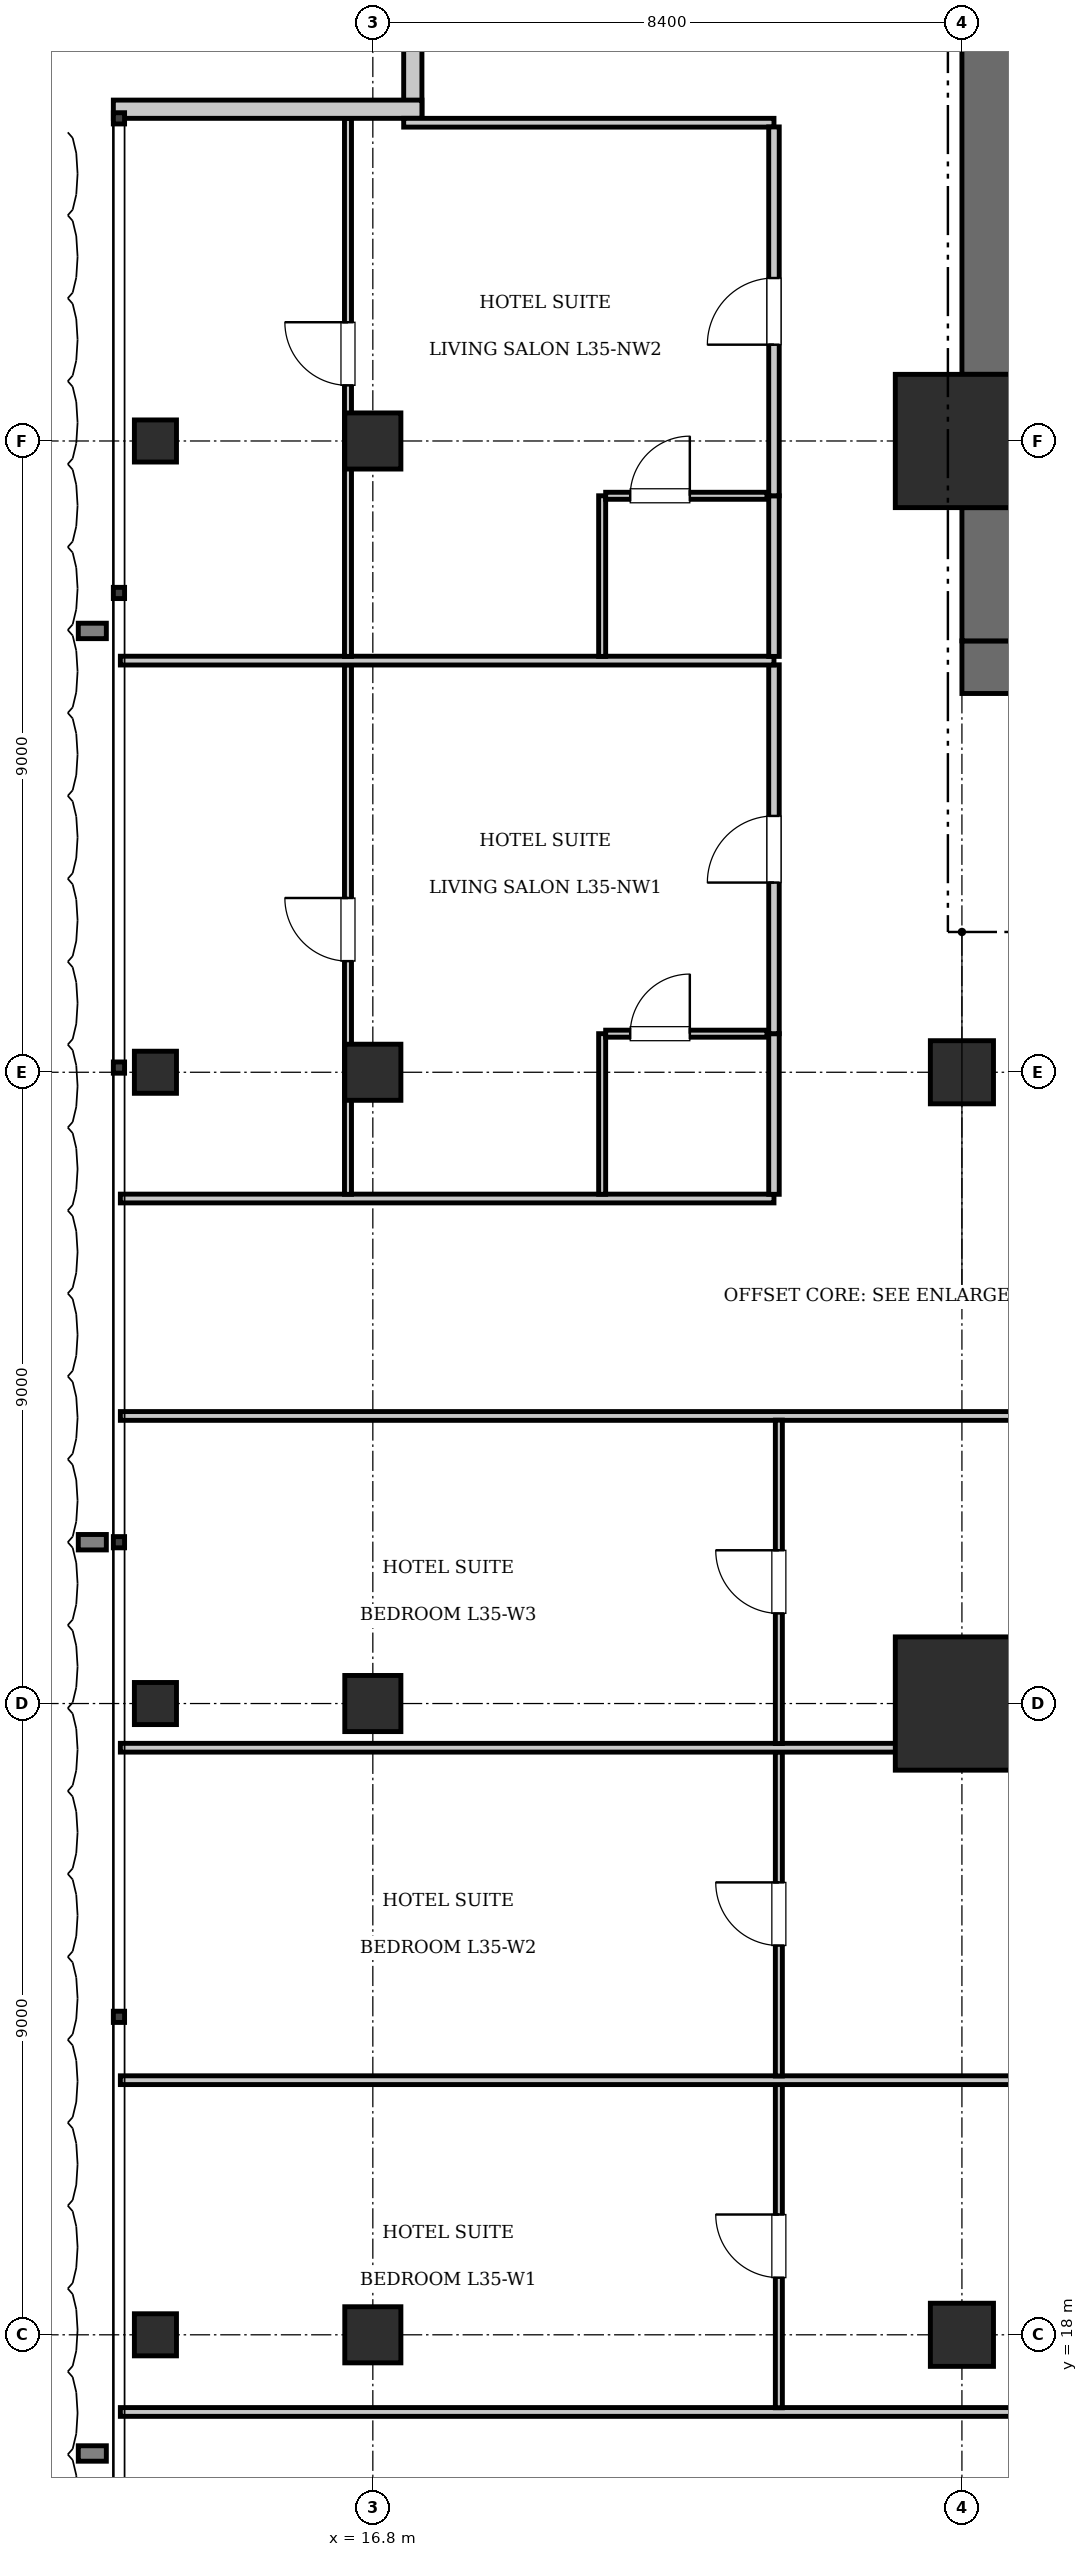
"""IFC4 building model, lengths in metres.
Left out: names, types, materials, properties, quantities, classifications, styles, units other than length and angle.
Written with IfcOpenShell. Run it as: python <this file> out.ifc"""

import sys

from ifc_helpers import new_model, si_unit, direction, frame, frame_2d, origin, origin_2d, place, context, subcontext, project, spatial, rectangle, i_section, extrude, element, fill, save


model = new_model("IFC4")
c1 = context("Model", 3, precision=1e-05, world=origin(), true_north=direction((0.0, 1.0)))
c2 = subcontext(c1, "Body", "Model", "MODEL_VIEW")
j1 = project(units=[si_unit("LENGTHUNIT", "METRE"), si_unit("PLANEANGLEUNIT", "RADIAN")], contexts=[c1])
p1 = place(None, origin())
s1 = spatial("IfcSite", under=j1, at=p1, CompositionType="ELEMENT")
p2 = place(p1, origin())
s2 = spatial("IfcBuilding", under=s1, at=p2, CompositionType="ELEMENT")
p3 = place(p2, frame((0.0, 0.0, 146.65)))
s3 = spatial("IfcBuildingStorey", under=s2, at=p3, CompositionType="ELEMENT", Elevation=146.65)
for number, where, z_axis, x_axis in (
    (1, (25.2, 27.0, 0.0), (0.0, 0.0, 1.0), (1.0, 0.0, 0.0)),
    (2, (25.2, 45.0, 0.0), (0.0, 0.0, 1.0), (1.0, 0.0, 0.0)),
):
    element("IfcColumn", number, at=place(p3, frame(where, z_axis=z_axis, x_axis=x_axis)), inside=s3, PredefinedType="COLUMN", context=c2, shape_type="SweptSolid", body=[
        extrude(rectangle(XDim=1.9, YDim=1.9, at=origin_2d()), origin(), (0.0, 0.0, 1.0), 3.85),
    ])
p4 = place(p3, frame((25.2, 41.775, 0.0), z_axis=(0.0, 0.0, 1.0), x_axis=(1.0, 0.0, 0.0)))
e3 = element("IfcWall", 3, at=p4, inside=s3, PredefinedType="SHEAR", context=c2, shape_type="SweptSolid", body=[
    extrude(rectangle(XDim=6.8, YDim=0.75, at=frame_2d((3.4, 0.0))), origin(), (0.0, 0.0, 1.0), 3.85),
])
p5 = place(p4, frame((1.65, 0.0, 0.0)))
e4 = element("IfcOpeningElement", 4, at=p5, cuts=e3, PredefinedType="OPENING", context=c2, shape_type="SweptSolid", body=[
    extrude(rectangle(XDim=1.15, YDim=2.15, at=frame_2d((0.575, 1.075))), frame((0.0, 0.385, 0.0), z_axis=(0.0, -1.0, 0.0), x_axis=(1.0, 0.0, 0.0)), (0.0, 0.0, 1.0), 0.77),
])
p6 = place(p4, frame((5.15, 0.0, 0.0)))
e5 = element("IfcOpeningElement", 5, at=p6, cuts=e3, PredefinedType="OPENING", context=c2, shape_type="SweptSolid", body=[
    extrude(rectangle(XDim=1.1, YDim=2.2, at=frame_2d((0.55, 1.1))), frame((0.0, 0.385, 0.0), z_axis=(0.0, -1.0, 0.0), x_axis=(1.0, 0.0, 0.0)), (0.0, 0.0, 1.0), 0.77),
])
p7 = place(p3, frame((25.575, 42.15, 0.0), z_axis=(0.0, 0.0, 1.0), x_axis=(0.0, 1.0, 0.0)))
e6 = element("IfcWall", 6, at=p7, inside=s3, PredefinedType="SHEAR", context=c2, shape_type="SweptSolid", body=[
    extrude(rectangle(XDim=1.9, YDim=0.75, at=frame_2d((0.95, 0.0))), origin(), (0.0, 0.0, 1.0), 3.85),
])
p8 = place(p3, frame((25.575, 45.95, 0.0), z_axis=(0.0, 0.0, 1.0), x_axis=(0.0, 1.0, 0.0)))
e7 = element("IfcWall", 7, at=p8, inside=s3, PredefinedType="SHEAR", context=c2, shape_type="SweptSolid", body=[
    extrude(rectangle(XDim=7.3, YDim=0.75, at=frame_2d((3.65, 0.0))), origin(), (0.0, 0.0, 1.0), 3.85),
])
for number, where, z_axis, x_axis in (
    (8, (25.2, 36.0, 0.0), (0.0, 0.0, 1.0), (1.0, 0.0, 0.0)),
    (9, (25.2, 18.0, 0.0), (0.0, 0.0, 1.0), (1.0, 0.0, 0.0)),
):
    element("IfcColumn", number, at=place(p3, frame(where, z_axis=z_axis, x_axis=x_axis)), inside=s3, PredefinedType="COLUMN", context=c2, shape_type="SweptSolid", body=[
        extrude(rectangle(XDim=0.9, YDim=0.9, at=origin_2d()), origin(), (0.0, 0.0, 1.0), 3.85),
    ])
for number, where, z_axis, x_axis in (
    (10, (16.8, 18.0, 0.0), (0.0, 0.0, 1.0), (1.0, 0.0, 0.0)),
    (11, (16.8, 27.0, 0.0), (0.0, 0.0, 1.0), (1.0, 0.0, 0.0)),
    (12, (16.8, 36.0, 0.0), (0.0, 0.0, 1.0), (1.0, 0.0, 0.0)),
    (13, (16.8, 45.0, 0.0), (0.0, 0.0, 1.0), (1.0, 0.0, 0.0)),
):
    element("IfcColumn", number, at=place(p3, frame(where, z_axis=z_axis, x_axis=x_axis)), inside=s3, PredefinedType="COLUMN", context=c2, shape_type="SweptSolid", body=[
        extrude(rectangle(XDim=0.8, YDim=0.8, at=origin_2d()), origin(), (0.0, 0.0, 1.0), 3.85),
    ])
for number, where, z_axis, x_axis in (
    (14, (13.7, 18.0, 0.0), (0.0, 0.0, 1.0), (1.0, 0.0, 0.0)),
    (15, (13.7, 27.0, 0.0), (0.0, 0.0, 1.0), (1.0, 0.0, 0.0)),
    (16, (13.7, 36.0, 0.0), (0.0, 0.0, 1.0), (1.0, 0.0, 0.0)),
    (17, (13.7, 45.0, 0.0), (0.0, 0.0, 1.0), (1.0, 0.0, 0.0)),
):
    element("IfcColumn", number, at=place(p3, frame(where, z_axis=z_axis, x_axis=x_axis)), inside=s3, PredefinedType="COLUMN", context=c2, shape_type="SweptSolid", body=[
        extrude(i_section(OverallWidth=0.6, OverallDepth=0.6, WebThickness=0.025, FlangeThickness=0.038, at=origin_2d()), origin(), (0.0, 0.0, 1.0), 3.85),
    ])
for number, where, z_axis, x_axis in (
    (18, (17.37, 49.6, 0.0), (0.0, 0.0, 1.0), (0.0, 1.0, 0.0)),
    (19, (13.1, 49.73, 0.0), (0.0, 0.0, 1.0), (1.0, 0.0, 0.0)),
):
    element("IfcWall", number, at=place(p3, frame(where, z_axis=z_axis, x_axis=x_axis)), inside=s3, PredefinedType="SOLIDWALL", context=c2, shape_type="SweptSolid", body=[
        extrude(rectangle(XDim=4.4, YDim=0.26, at=frame_2d((2.2, 0.0))), origin(), (0.0, 0.0, 1.0), 3.61),
    ])
for number, where, z_axis, x_axis in (
    (20, (13.2, 16.9, 0.0), (0.0, 0.0, 1.0), (1.0, 0.0, 0.0)),
    (21, (13.2, 31.1, 0.0), (0.0, 0.0, 1.0), (1.0, 0.0, 0.0)),
):
    element("IfcWall", number, at=place(p3, frame(where, z_axis=z_axis, x_axis=x_axis)), inside=s3, PredefinedType="PARTITIONING", context=c2, shape_type="SweptSolid", body=[
        extrude(rectangle(XDim=22.12, YDim=0.125, at=frame_2d((11.06, 0.0))), origin(), (0.0, 0.0, 1.0), 3.61),
    ])
p9 = place(p3, frame((22.59, 16.96, 0.0), z_axis=(0.0, 0.0, 1.0), x_axis=(0.0, 1.0, 0.0)))
e22 = element("IfcWall", 22, at=p9, inside=s3, PredefinedType="PARTITIONING", context=c2, shape_type="SweptSolid", body=[
    extrude(rectangle(XDim=4.61, YDim=0.1, at=frame_2d((2.305, 0.0))), origin(), (0.0, 0.0, 1.0), 3.61),
])
p10 = place(p9, frame((1.855, 0.0, 0.0)))
e23 = element("IfcOpeningElement", 23, at=p10, cuts=e22, PredefinedType="OPENING", context=c2, shape_type="SweptSolid", body=[
    extrude(rectangle(XDim=0.9, YDim=2.1, at=frame_2d((0.45, 1.05))), frame((0.0, 0.06, 0.0), z_axis=(0.0, -1.0, 0.0), x_axis=(1.0, 0.0, 0.0)), (0.0, 0.0, 1.0), 0.12),
])
p11 = place(p3, frame((13.2, 21.63, 0.0), z_axis=(0.0, 0.0, 1.0), x_axis=(1.0, 0.0, 0.0)))
e24 = element("IfcWall", 24, at=p11, inside=s3, PredefinedType="PARTITIONING", context=c2, shape_type="SweptSolid", body=[
    extrude(rectangle(XDim=22.12, YDim=0.125, at=frame_2d((11.06, 0.0))), origin(), (0.0, 0.0, 1.0), 3.61),
])
p12 = place(p3, frame((22.59, 21.69, 0.0), z_axis=(0.0, 0.0, 1.0), x_axis=(0.0, 1.0, 0.0)))
e25 = element("IfcWall", 25, at=p12, inside=s3, PredefinedType="PARTITIONING", context=c2, shape_type="SweptSolid", body=[
    extrude(rectangle(XDim=4.62, YDim=0.1, at=frame_2d((2.31, 0.0))), origin(), (0.0, 0.0, 1.0), 3.61),
])
p13 = place(p12, frame((1.86, 0.0, 0.0)))
e26 = element("IfcOpeningElement", 26, at=p13, cuts=e25, PredefinedType="OPENING", context=c2, shape_type="SweptSolid", body=[
    extrude(rectangle(XDim=0.9, YDim=2.1, at=frame_2d((0.45, 1.05))), frame((0.0, 0.06, 0.0), z_axis=(0.0, -1.0, 0.0), x_axis=(1.0, 0.0, 0.0)), (0.0, 0.0, 1.0), 0.12),
])
p14 = place(p3, frame((13.2, 26.37, 0.0), z_axis=(0.0, 0.0, 1.0), x_axis=(1.0, 0.0, 0.0)))
e27 = element("IfcWall", 27, at=p14, inside=s3, PredefinedType="PARTITIONING", context=c2, shape_type="SweptSolid", body=[
    extrude(rectangle(XDim=22.12, YDim=0.125, at=frame_2d((11.06, 0.0))), origin(), (0.0, 0.0, 1.0), 3.61),
])
p15 = place(p3, frame((22.59, 26.43, 0.0), z_axis=(0.0, 0.0, 1.0), x_axis=(0.0, 1.0, 0.0)))
e28 = element("IfcWall", 28, at=p15, inside=s3, PredefinedType="PARTITIONING", context=c2, shape_type="SweptSolid", body=[
    extrude(rectangle(XDim=4.61, YDim=0.1, at=frame_2d((2.305, 0.0))), origin(), (0.0, 0.0, 1.0), 3.61),
])
p16 = place(p15, frame((1.855, 0.0, 0.0)))
e29 = element("IfcOpeningElement", 29, at=p16, cuts=e28, PredefinedType="OPENING", context=c2, shape_type="SweptSolid", body=[
    extrude(rectangle(XDim=0.9, YDim=2.1, at=frame_2d((0.45, 1.05))), frame((0.0, 0.06, 0.0), z_axis=(0.0, -1.0, 0.0), x_axis=(1.0, 0.0, 0.0)), (0.0, 0.0, 1.0), 0.12),
])
p17 = place(p3, frame((13.2, 34.2, 0.0), z_axis=(0.0, 0.0, 1.0), x_axis=(1.0, 0.0, 0.0)))
e30 = element("IfcWall", 30, at=p17, inside=s3, PredefinedType="PARTITIONING", context=c2, shape_type="SweptSolid", body=[
    extrude(rectangle(XDim=9.32, YDim=0.125, at=frame_2d((4.66, 0.0))), origin(), (0.0, 0.0, 1.0), 3.61),
])
p18 = place(p3, frame((17.24, 49.538, 0.0), z_axis=(0.0, 0.0, 1.0), x_axis=(1.0, 0.0, 0.0)))
e31 = element("IfcWall", 31, at=p18, inside=s3, PredefinedType="PARTITIONING", context=c2, shape_type="SweptSolid", body=[
    extrude(rectangle(XDim=5.28, YDim=0.125, at=frame_2d((2.64, 0.0))), origin(), (0.0, 0.0, 1.0), 3.61),
])
p19 = place(p3, frame((22.52, 34.26, 0.0), z_axis=(0.0, 0.0, 1.0), x_axis=(0.0, 1.0, 0.0)))
e32 = element("IfcWall", 32, at=p19, inside=s3, PredefinedType="PARTITIONING", context=c2, shape_type="SweptSolid", body=[
    extrude(rectangle(XDim=2.29, YDim=0.15, at=frame_2d((1.145, 0.0))), origin(), (0.0, 0.0, 1.0), 3.61),
])
p20 = place(p3, frame((22.52, 36.55, 0.0), z_axis=(0.0, 0.0, 1.0), x_axis=(0.0, 1.0, 0.0)))
e33 = element("IfcWall", 33, at=p20, inside=s3, PredefinedType="PARTITIONING", context=c2, shape_type="SweptSolid", body=[
    extrude(rectangle(XDim=5.259, YDim=0.15, at=frame_2d((2.629, 0.0))), origin(), (0.0, 0.0, 1.0), 3.61),
])
p21 = place(p20, frame((2.154, 0.0, 0.0)))
e34 = element("IfcOpeningElement", 34, at=p21, cuts=e33, PredefinedType="OPENING", context=c2, shape_type="SweptSolid", body=[
    extrude(rectangle(XDim=0.95, YDim=2.15, at=frame_2d((0.475, 1.075))), frame((0.0, 0.085, 0.0), z_axis=(0.0, -1.0, 0.0), x_axis=(1.0, 0.0, 0.0)), (0.0, 0.0, 1.0), 0.17),
])
p22 = place(p3, frame((20.07, 34.26, 0.0), z_axis=(0.0, 0.0, 1.0), x_axis=(0.0, 1.0, 0.0)))
e35 = element("IfcWall", 35, at=p22, inside=s3, PredefinedType="PARTITIONING", context=c2, shape_type="SweptSolid", body=[
    extrude(rectangle(XDim=2.29, YDim=0.1, at=frame_2d((1.145, 0.0))), origin(), (0.0, 0.0, 1.0), 3.61),
])
p23 = place(p3, frame((20.12, 36.55, 0.0), z_axis=(0.0, 0.0, 1.0), x_axis=(1.0, 0.0, 0.0)))
e36 = element("IfcWall", 36, at=p23, inside=s3, PredefinedType="PARTITIONING", context=c2, shape_type="SweptSolid", body=[
    extrude(rectangle(XDim=2.3, YDim=0.1, at=frame_2d((1.15, 0.0))), origin(), (0.0, 0.0, 1.0), 3.61),
])
p24 = place(p23, frame((0.35, 0.0, 0.0)))
e37 = element("IfcOpeningElement", 37, at=p24, cuts=e36, PredefinedType="OPENING", context=c2, shape_type="SweptSolid", body=[
    extrude(rectangle(XDim=0.85, YDim=2.1, at=frame_2d((0.425, 1.05))), frame((0.0, 0.06, 0.0), z_axis=(0.0, -1.0, 0.0), x_axis=(1.0, 0.0, 0.0)), (0.0, 0.0, 1.0), 0.12),
])
p25 = place(p3, frame((16.446, 34.26, 0.0), z_axis=(0.0, 0.0, 1.0), x_axis=(0.0, 1.0, 0.0)))
e38 = element("IfcWall", 38, at=p25, inside=s3, PredefinedType="PARTITIONING", context=c2, shape_type="SweptSolid", body=[
    extrude(rectangle(XDim=7.549, YDim=0.1, at=frame_2d((3.774, 0.0))), origin(), (0.0, 0.0, 1.0), 3.61),
])
p26 = place(p25, frame((3.324, 0.0, 0.0)))
e39 = element("IfcOpeningElement", 39, at=p26, cuts=e38, PredefinedType="OPENING", context=c2, shape_type="SweptSolid", body=[
    extrude(rectangle(XDim=0.9, YDim=2.1, at=frame_2d((0.45, 1.05))), frame((0.0, 0.06, 0.0), z_axis=(0.0, -1.0, 0.0), x_axis=(1.0, 0.0, 0.0)), (0.0, 0.0, 1.0), 0.12),
])
p27 = place(p3, frame((13.2, 41.869, 0.0), z_axis=(0.0, 0.0, 1.0), x_axis=(1.0, 0.0, 0.0)))
e40 = element("IfcWall", 40, at=p27, inside=s3, PredefinedType="PARTITIONING", context=c2, shape_type="SweptSolid", body=[
    extrude(rectangle(XDim=9.32, YDim=0.125, at=frame_2d((4.66, 0.0))), origin(), (0.0, 0.0, 1.0), 3.61),
])
p28 = place(p3, frame((22.52, 41.929, 0.0), z_axis=(0.0, 0.0, 1.0), x_axis=(0.0, 1.0, 0.0)))
e41 = element("IfcWall", 41, at=p28, inside=s3, PredefinedType="PARTITIONING", context=c2, shape_type="SweptSolid", body=[
    extrude(rectangle(XDim=2.29, YDim=0.15, at=frame_2d((1.145, 0.0))), origin(), (0.0, 0.0, 1.0), 3.61),
])
p29 = place(p3, frame((22.52, 44.219, 0.0), z_axis=(0.0, 0.0, 1.0), x_axis=(0.0, 1.0, 0.0)))
e42 = element("IfcWall", 42, at=p29, inside=s3, PredefinedType="PARTITIONING", context=c2, shape_type="SweptSolid", body=[
    extrude(rectangle(XDim=5.259, YDim=0.15, at=frame_2d((2.629, 0.0))), origin(), (0.0, 0.0, 1.0), 3.61),
])
p30 = place(p29, frame((2.154, 0.0, 0.0)))
e43 = element("IfcOpeningElement", 43, at=p30, cuts=e42, PredefinedType="OPENING", context=c2, shape_type="SweptSolid", body=[
    extrude(rectangle(XDim=0.95, YDim=2.15, at=frame_2d((0.475, 1.075))), frame((0.0, 0.085, 0.0), z_axis=(0.0, -1.0, 0.0), x_axis=(1.0, 0.0, 0.0)), (0.0, 0.0, 1.0), 0.17),
])
p31 = place(p3, frame((20.07, 41.929, 0.0), z_axis=(0.0, 0.0, 1.0), x_axis=(0.0, 1.0, 0.0)))
e44 = element("IfcWall", 44, at=p31, inside=s3, PredefinedType="PARTITIONING", context=c2, shape_type="SweptSolid", body=[
    extrude(rectangle(XDim=2.29, YDim=0.1, at=frame_2d((1.145, 0.0))), origin(), (0.0, 0.0, 1.0), 3.61),
])
p32 = place(p3, frame((20.12, 44.219, 0.0), z_axis=(0.0, 0.0, 1.0), x_axis=(1.0, 0.0, 0.0)))
e45 = element("IfcWall", 45, at=p32, inside=s3, PredefinedType="PARTITIONING", context=c2, shape_type="SweptSolid", body=[
    extrude(rectangle(XDim=2.3, YDim=0.1, at=frame_2d((1.15, 0.0))), origin(), (0.0, 0.0, 1.0), 3.61),
])
p33 = place(p32, frame((0.35, 0.0, 0.0)))
e46 = element("IfcOpeningElement", 46, at=p33, cuts=e45, PredefinedType="OPENING", context=c2, shape_type="SweptSolid", body=[
    extrude(rectangle(XDim=0.85, YDim=2.1, at=frame_2d((0.425, 1.05))), frame((0.0, 0.06, 0.0), z_axis=(0.0, -1.0, 0.0), x_axis=(1.0, 0.0, 0.0)), (0.0, 0.0, 1.0), 0.12),
])
p34 = place(p3, frame((16.446, 41.929, 0.0), z_axis=(0.0, 0.0, 1.0), x_axis=(0.0, 1.0, 0.0)))
e47 = element("IfcWall", 47, at=p34, inside=s3, PredefinedType="PARTITIONING", context=c2, shape_type="SweptSolid", body=[
    extrude(rectangle(XDim=7.669, YDim=0.1, at=frame_2d((3.834, 0.0))), origin(), (0.0, 0.0, 1.0), 3.61),
])
p35 = place(p34, frame((3.864, 0.0, 0.0)))
e48 = element("IfcOpeningElement", 48, at=p35, cuts=e47, PredefinedType="OPENING", context=c2, shape_type="SweptSolid", body=[
    extrude(rectangle(XDim=0.9, YDim=2.1, at=frame_2d((0.45, 1.05))), frame((0.0, 0.06, 0.0), z_axis=(0.0, -1.0, 0.0), x_axis=(1.0, 0.0, 0.0)), (0.0, 0.0, 1.0), 0.12),
])
p36 = place(p10, origin())
e49 = element("IfcDoor", 49, at=p36, inside=s3, OperationType="SINGLE_SWING_RIGHT", PredefinedType="DOOR", context=c2, shape_type="SweptSolid", body=[
    extrude(rectangle(XDim=0.9, YDim=2.1, at=frame_2d((0.45, 1.05))), frame((0.0, 0.025, 0.0), z_axis=(0.0, -1.0, 0.0), x_axis=(1.0, 0.0, 0.0)), (0.0, 0.0, 1.0), 0.05),
])
fill(e23, e49)
p37 = place(p13, origin())
e50 = element("IfcDoor", 50, at=p37, inside=s3, OperationType="SINGLE_SWING_RIGHT", PredefinedType="DOOR", context=c2, shape_type="SweptSolid", body=[
    extrude(rectangle(XDim=0.9, YDim=2.1, at=frame_2d((0.45, 1.05))), frame((0.0, 0.025, 0.0), z_axis=(0.0, -1.0, 0.0), x_axis=(1.0, 0.0, 0.0)), (0.0, 0.0, 1.0), 0.05),
])
fill(e26, e50)
p38 = place(p16, origin())
e51 = element("IfcDoor", 51, at=p38, inside=s3, OperationType="SINGLE_SWING_RIGHT", PredefinedType="DOOR", context=c2, shape_type="SweptSolid", body=[
    extrude(rectangle(XDim=0.9, YDim=2.1, at=frame_2d((0.45, 1.05))), frame((0.0, 0.025, 0.0), z_axis=(0.0, -1.0, 0.0), x_axis=(1.0, 0.0, 0.0)), (0.0, 0.0, 1.0), 0.05),
])
fill(e29, e51)
p39 = place(p24, origin())
e52 = element("IfcDoor", 52, at=p39, inside=s3, OperationType="SINGLE_SWING_RIGHT", PredefinedType="DOOR", context=c2, shape_type="SweptSolid", body=[
    extrude(rectangle(XDim=0.85, YDim=2.1, at=frame_2d((0.425, 1.05))), frame((0.0, 0.025, 0.0), z_axis=(0.0, -1.0, 0.0), x_axis=(1.0, 0.0, 0.0)), (0.0, 0.0, 1.0), 0.05),
])
fill(e37, e52)
p40 = place(p21, origin())
e53 = element("IfcDoor", 53, at=p40, inside=s3, OperationType="SINGLE_SWING_LEFT", PredefinedType="DOOR", context=c2, shape_type="SweptSolid", body=[
    extrude(rectangle(XDim=0.95, YDim=2.15, at=frame_2d((0.475, 1.075))), frame((0.0, 0.025, 0.0), z_axis=(0.0, -1.0, 0.0), x_axis=(1.0, 0.0, 0.0)), (0.0, 0.0, 1.0), 0.05),
])
fill(e34, e53)
p41 = place(p26, origin())
e54 = element("IfcDoor", 54, at=p41, inside=s3, OperationType="SINGLE_SWING_RIGHT", PredefinedType="DOOR", context=c2, shape_type="SweptSolid", body=[
    extrude(rectangle(XDim=0.9, YDim=2.1, at=frame_2d((0.45, 1.05))), frame((0.0, 0.025, 0.0), z_axis=(0.0, -1.0, 0.0), x_axis=(1.0, 0.0, 0.0)), (0.0, 0.0, 1.0), 0.05),
])
fill(e39, e54)
p42 = place(p33, origin())
e55 = element("IfcDoor", 55, at=p42, inside=s3, OperationType="SINGLE_SWING_RIGHT", PredefinedType="DOOR", context=c2, shape_type="SweptSolid", body=[
    extrude(rectangle(XDim=0.85, YDim=2.1, at=frame_2d((0.425, 1.05))), frame((0.0, 0.025, 0.0), z_axis=(0.0, -1.0, 0.0), x_axis=(1.0, 0.0, 0.0)), (0.0, 0.0, 1.0), 0.05),
])
fill(e46, e55)
p43 = place(p30, origin())
e56 = element("IfcDoor", 56, at=p43, inside=s3, OperationType="SINGLE_SWING_LEFT", PredefinedType="DOOR", context=c2, shape_type="SweptSolid", body=[
    extrude(rectangle(XDim=0.95, YDim=2.15, at=frame_2d((0.475, 1.075))), frame((0.0, 0.025, 0.0), z_axis=(0.0, -1.0, 0.0), x_axis=(1.0, 0.0, 0.0)), (0.0, 0.0, 1.0), 0.05),
])
fill(e43, e56)
p44 = place(p35, origin())
e57 = element("IfcDoor", 57, at=p44, inside=s3, OperationType="SINGLE_SWING_RIGHT", PredefinedType="DOOR", context=c2, shape_type="SweptSolid", body=[
    extrude(rectangle(XDim=0.9, YDim=2.1, at=frame_2d((0.45, 1.05))), frame((0.0, 0.025, 0.0), z_axis=(0.0, -1.0, 0.0), x_axis=(1.0, 0.0, 0.0)), (0.0, 0.0, 1.0), 0.05),
])
fill(e48, e57)
save(model, sys.argv[1])
